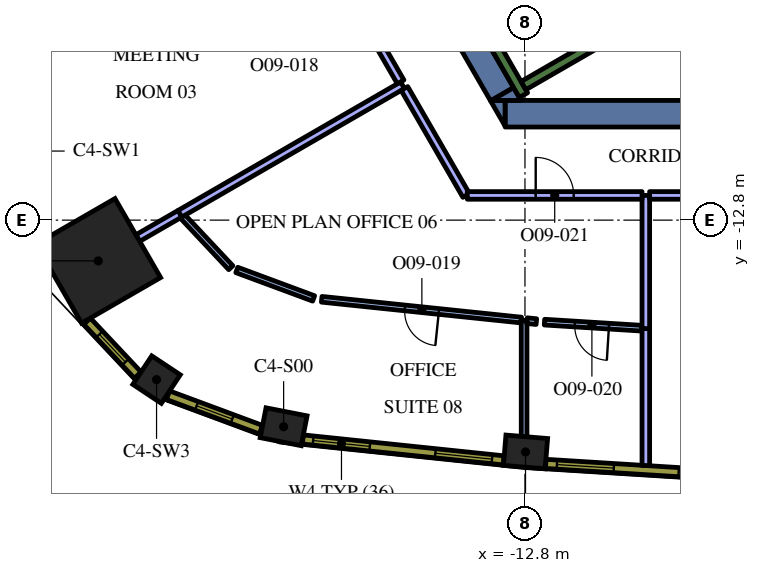
"""IFC4 building model, lengths in metres.
Left out: names, types, materials, properties, quantities, classifications, styles, units other than length and angle.
Written with IfcOpenShell. Run it as: python <this file> out.ifc"""

import sys

from ifc_helpers import new_model, si_unit, direction, frame, frame_2d, origin, origin_2d, place, context, subcontext, project, spatial, polyline, rectangle, outline, extrude, element, fill, save


model = new_model("IFC4")
c1 = context("Model", 3, precision=1e-05, world=origin(), true_north=direction((0.0, 1.0)))
c2 = subcontext(c1, "Body", "Model", "MODEL_VIEW")
j1 = project(units=[si_unit("LENGTHUNIT", "METRE"), si_unit("PLANEANGLEUNIT", "RADIAN")], contexts=[c1])
p1 = place(None, origin())
s1 = spatial("IfcSite", under=j1, at=p1, CompositionType="ELEMENT")
p2 = place(p1, origin())
s2 = spatial("IfcBuilding", under=s1, at=p2, CompositionType="ELEMENT")
p3 = place(p2, frame((0.0, 0.0, 243.6)))
s3 = spatial("IfcBuildingStorey", under=s2, at=p3, CompositionType="ELEMENT", Elevation=243.6)
p4 = place(p3, frame((-24.027, -13.872, 0.0), z_axis=(0.0, 0.0, 1.0), x_axis=(-0.866025403784, -0.5, 0.0)))
e1 = element("IfcColumn", 1, at=p4, inside=s3, PredefinedType="COLUMN", context=c2, shape_type="SweptSolid", body=[
    extrude(rectangle(XDim=2.4, YDim=2.4, at=origin_2d()), origin(), (0.0, 0.0, 1.0), 4.2),
])
for number, where, z_axis, x_axis in (
    (2, (-19.15, -18.237, 0.0), (0.0, 0.0, 1.0), (0.981, -0.192, 0.0)),
    (3, (-12.785, -18.9, 0.0), (0.0, 0.0, 1.0), (0.997, -0.083, 0.0)),
):
    element("IfcColumn", number, at=place(p3, frame(where, z_axis=z_axis, x_axis=x_axis)), inside=s3, PredefinedType="COLUMN", context=c2, shape_type="SweptSolid", body=[
        extrude(rectangle(XDim=1.1, YDim=0.8, at=origin_2d()), origin(), (0.0, 0.0, 1.0), 4.2),
    ])
p5 = place(p3, frame((-22.494, -16.997, 0.0), z_axis=(0.0, 0.0, 1.0), x_axis=(0.833238868178, -0.552913183563, 0.0)))
e4 = element("IfcColumn", 4, at=p5, inside=s3, PredefinedType="COLUMN", context=c2, shape_type="SweptSolid", body=[
    extrude(rectangle(XDim=0.9, YDim=0.9, at=origin_2d()), origin(), (0.0, 0.0, 1.0), 4.2),
])
p6 = place(p3, frame((8.904, -10.0, 0.0), z_axis=(0.0, 0.0, 1.0), x_axis=(-1.0, 0.0, 0.0)))
e5 = element("IfcWall", 5, at=p6, inside=s3, PredefinedType="SOLIDWALL", context=c2, shape_type="SweptSolid", body=[
    extrude(rectangle(XDim=22.226, YDim=0.7, at=frame_2d((11.113, 0.0))), origin(), (0.0, 0.0, 1.0), 4.2),
])
p7 = place(p3, origin())
e6 = element("IfcWall", 6, at=p7, inside=s3, PredefinedType="SOLIDWALL", context=c2, shape_type="SweptSolid", body=[
    extrude(outline(polyline([(-13.712, -9.65), (-13.324, -9.65), (-13.324, -10.322), (-13.712, -9.65)])), origin(), (0.0, 0.0, 1.0), 4.2),
])
p8 = place(p3, frame((-13.402, -9.487, 0.0), z_axis=(0.0, 0.0, 1.0), x_axis=(-0.500020498207, 0.866013568815, 0.0)))
e7 = element("IfcWall", 7, at=p8, inside=s3, PredefinedType="SOLIDWALL", context=c2, shape_type="SweptSolid", body=[
    extrude(rectangle(XDim=3.829, YDim=0.7, at=frame_2d((1.915, 0.0))), origin(), (0.0, 0.0, 1.0), 4.2),
])
e8 = element("IfcWall", 8, at=p7, inside=s3, PredefinedType="SOLIDWALL", context=c2, shape_type="SweptSolid", body=[
    extrude(outline(polyline([(-12.904, -9.65), (-13.68, -9.65), (-13.098, -9.314), (-12.904, -9.65)])), origin(), (0.0, 0.0, 1.0), 4.2),
])
p9 = place(p3, frame((-12.84, -9.511, 0.0), z_axis=(0.0, 0.0, 1.0), x_axis=(-0.499997733992, 0.866026712061, 0.0)))
e9 = element("IfcWall", 9, at=p9, inside=s3, PredefinedType="SOLIDWALL", context=c2, shape_type="SweptSolid", body=[
    extrude(rectangle(XDim=3.634, YDim=0.25, at=frame_2d((1.817, 0.0))), origin(), (0.0, 0.0, 1.0), 4.2),
])
p10 = place(p3, frame((-12.84, -9.261, 0.0), z_axis=(0.0, 0.0, 1.0), x_axis=(0.866016039709, 0.500016218704, 0.0)))
e10 = element("IfcWall", 10, at=p10, inside=s3, PredefinedType="SOLIDWALL", context=c2, shape_type="SweptSolid", body=[
    extrude(rectangle(XDim=7.05, YDim=0.25, at=frame_2d((3.525, 0.0))), origin(), (0.0, 0.0, 1.0), 4.2),
])
p11 = place(p3, frame((-9.62, -19.257, 0.0), z_axis=(0.0, 0.0, 1.0), x_axis=(0.0, 1.0, 0.0)))
e11 = element("IfcWall", 11, at=p11, inside=s3, PredefinedType="PARTITIONING", context=c2, shape_type="SweptSolid", body=[
    extrude(rectangle(XDim=3.611, YDim=0.2, at=frame_2d((1.806, 0.0))), origin(), (0.0, 0.0, 1.0), 3.45),
])
p12 = place(p3, frame((-9.62, -15.654, 0.0), z_axis=(0.0, 0.0, 1.0), x_axis=(0.0, 1.0, 0.0)))
e12 = element("IfcWall", 12, at=p12, inside=s3, PredefinedType="PARTITIONING", context=c2, shape_type="SweptSolid", body=[
    extrude(rectangle(XDim=3.504, YDim=0.2, at=frame_2d((1.752, 0.0))), origin(), (0.0, 0.0, 1.0), 3.45),
])
p13 = place(p3, frame((-9.52, -12.15, 0.0), z_axis=(0.0, 0.0, 1.0), x_axis=(1.0, 0.0, 0.0)))
e13 = element("IfcWall", 13, at=p13, inside=s3, PredefinedType="PARTITIONING", context=c2, shape_type="SweptSolid", body=[
    extrude(rectangle(XDim=2.49, YDim=0.2, at=frame_2d((1.245, 0.0))), origin(), (0.0, 0.0, 1.0), 3.45),
])
p14 = place(p3, frame((-21.873, -12.628, 0.0), z_axis=(0.0, 0.0, 1.0), x_axis=(-0.866052988967, -0.499952218018, 0.0)))
e14 = element("IfcWall", 14, at=p14, inside=s3, PredefinedType="PARTITIONING", context=c2, shape_type="SweptSolid", body=[
    extrude(rectangle(XDim=1.288, YDim=0.2, at=frame_2d((0.644, 0.0))), origin(), (0.0, 0.0, 1.0), 3.45),
])
p15 = place(p3, frame((-16.021, -9.25, 0.0), z_axis=(0.0, 0.0, 1.0), x_axis=(-0.86602692059, -0.499997372806, 0.0)))
e15 = element("IfcWall", 15, at=p15, inside=s3, PredefinedType="PARTITIONING", context=c2, shape_type="SweptSolid", body=[
    extrude(rectangle(XDim=6.765, YDim=0.2, at=frame_2d((3.382, 0.0))), origin(), (0.0, 0.0, 1.0), 3.45),
])
p16 = place(p3, frame((-17.545, -6.612, 0.0), z_axis=(0.0, 0.0, 1.0), x_axis=(0.500006981563, -0.86602137294, 0.0)))
e16 = element("IfcWall", 16, at=p16, inside=s3, PredefinedType="PARTITIONING", context=c2, shape_type="SweptSolid", body=[
    extrude(rectangle(XDim=2.946, YDim=0.2, at=frame_2d((1.473, 0.0))), origin(), (0.0, 0.0, 1.0), 3.45),
])
p17 = place(p3, frame((-12.823, -15.437, 0.0), z_axis=(0.0, 0.0, 1.0), x_axis=(0.0, -1.0, 0.0)))
e17 = element("IfcWall", 17, at=p17, inside=s3, PredefinedType="PARTITIONING", context=c2, shape_type="SweptSolid", body=[
    extrude(rectangle(XDim=3.058, YDim=0.15, at=frame_2d((1.529, 0.0))), origin(), (0.0, 0.0, 1.0), 3.45),
])
p18 = place(p3, frame((-21.806, -12.705, 0.0), z_axis=(0.0, 0.0, 1.0), x_axis=(0.684700980092, -0.728824099396, 0.0)))
e18 = element("IfcWall", 18, at=p18, inside=s3, PredefinedType="PARTITIONING", context=c2, shape_type="SweptSolid", body=[
    extrude(rectangle(XDim=1.848, YDim=0.15, at=frame_2d((0.924, 0.0))), origin(), (0.0, 0.0, 1.0), 3.45),
])
p19 = place(p3, frame((-20.383, -14.111, 0.0), z_axis=(0.0, 0.0, 1.0), x_axis=(0.937598383102, -0.347720105838, 0.0)))
e19 = element("IfcWall", 19, at=p19, inside=s3, PredefinedType="PARTITIONING", context=c2, shape_type="SweptSolid", body=[
    extrude(rectangle(XDim=2.156, YDim=0.15, at=frame_2d((1.078, 0.0))), origin(), (0.0, 0.0, 1.0), 3.45),
])
p20 = place(p3, frame((-12.898, -15.429, 0.0), z_axis=(0.0, 0.0, 1.0), x_axis=(-0.99462039429, 0.103587022653, 0.0)))
e20 = element("IfcWall", 20, at=p20, inside=s3, PredefinedType="PARTITIONING", context=c2, shape_type="SweptSolid", body=[
    extrude(rectangle(XDim=5.279, YDim=0.15, at=frame_2d((2.64, 0.0))), origin(), (0.0, 0.0, 1.0), 3.45),
])
p21 = place(p20, frame((2.179, 0.0, 0.0)))
e21 = element("IfcOpeningElement", 21, at=p21, cuts=e20, PredefinedType="OPENING", context=c2, shape_type="SweptSolid", body=[
    extrude(rectangle(XDim=0.9, YDim=2.1, at=frame_2d((0.45, 1.05))), frame((0.0, 0.085, 0.0), z_axis=(0.0, -1.0, 0.0), x_axis=(1.0, 0.0, 0.0)), (0.0, 0.0, 1.0), 0.17),
])
p22 = place(p3, frame((-12.748, -15.445, 0.0), z_axis=(0.0, 0.0, 1.0), x_axis=(0.99468140225, -0.102999553487, 0.0)))
e22 = element("IfcWall", 22, at=p22, inside=s3, PredefinedType="PARTITIONING", context=c2, shape_type="SweptSolid", body=[
    extrude(rectangle(XDim=0.249, YDim=0.15, at=frame_2d((0.125, 0.0))), origin(), (0.0, 0.0, 1.0), 3.45),
])
p23 = place(p3, frame((-9.72, -15.644, 0.0), z_axis=(0.0, 0.0, 1.0), x_axis=(-0.998064382534, 0.062189133425, 0.0)))
e23 = element("IfcWall", 23, at=p23, inside=s3, PredefinedType="PARTITIONING", context=c2, shape_type="SweptSolid", body=[
    extrude(rectangle(XDim=2.571, YDim=0.15, at=frame_2d((1.286, 0.0))), origin(), (0.0, 0.0, 1.0), 3.45),
])
p24 = place(p23, frame((0.871, 0.0, 0.0)))
e24 = element("IfcOpeningElement", 24, at=p24, cuts=e23, PredefinedType="OPENING", context=c2, shape_type="SweptSolid", body=[
    extrude(rectangle(XDim=0.9, YDim=2.1, at=frame_2d((0.45, 1.05))), frame((0.0, 0.085, 0.0), z_axis=(0.0, -1.0, 0.0), x_axis=(1.0, 0.0, 0.0)), (0.0, 0.0, 1.0), 0.17),
])
p25 = place(p3, frame((-15.971, -9.337, 0.0), z_axis=(0.0, 0.0, 1.0), x_axis=(0.500010870188, -0.866019127788, 0.0)))
e25 = element("IfcWall", 25, at=p25, inside=s3, PredefinedType="PARTITIONING", context=c2, shape_type="SweptSolid", body=[
    extrude(rectangle(XDim=3.249, YDim=0.2, at=frame_2d((1.624, 0.0))), origin(), (0.0, 0.0, 1.0), 3.45),
])
p26 = place(p3, frame((-14.317, -12.15, 0.0), z_axis=(0.0, 0.0, 1.0), x_axis=(1.0, 0.0, 0.0)))
e26 = element("IfcWall", 26, at=p26, inside=s3, PredefinedType="PARTITIONING", context=c2, shape_type="SweptSolid", body=[
    extrude(rectangle(XDim=4.597, YDim=0.2, at=frame_2d((2.299, 0.0))), origin(), (0.0, 0.0, 1.0), 3.45),
])
p27 = place(p26, frame((1.8, 0.0, 0.0)))
e27 = element("IfcOpeningElement", 27, at=p27, cuts=e26, PredefinedType="OPENING", context=c2, shape_type="SweptSolid", body=[
    extrude(rectangle(XDim=1.0, YDim=2.1, at=frame_2d((0.5, 1.05))), frame((0.0, 0.11, 0.0), z_axis=(0.0, -1.0, 0.0), x_axis=(1.0, 0.0, 0.0)), (0.0, 0.0, 1.0), 0.22),
])
p28 = place(p3, frame((-18.644, -18.571, 0.0), z_axis=(0.0, 0.0, 1.0), x_axis=(0.994621961215, -0.103571976272, 0.0)))
e28 = element("IfcWall", 28, at=p28, inside=s3, PredefinedType="SOLIDWALL", context=c2, shape_type="SweptSolid", body=[
    extrude(rectangle(XDim=5.311, YDim=0.24, at=frame_2d((2.655, 0.0))), origin(), (0.0, 0.0, 1.0), 3.95),
])
p29 = place(p28, frame((0.271, 0.0, 0.9)))
e29 = element("IfcOpeningElement", 29, at=p29, cuts=e28, PredefinedType="OPENING", context=c2, shape_type="SweptSolid", body=[
    extrude(rectangle(XDim=1.5, YDim=2.55, at=frame_2d((0.75, 1.275))), frame((0.0, 0.13, 0.0), z_axis=(0.0, -1.0, 0.0), x_axis=(1.0, 0.0, 0.0)), (0.0, 0.0, 1.0), 0.26),
])
p30 = place(p28, frame((3.504, 0.0, 0.9)))
e30 = element("IfcOpeningElement", 30, at=p30, cuts=e28, PredefinedType="OPENING", context=c2, shape_type="SweptSolid", body=[
    extrude(rectangle(XDim=1.5, YDim=2.55, at=frame_2d((0.75, 1.275))), frame((0.0, 0.13, 0.0), z_axis=(0.0, -1.0, 0.0), x_axis=(1.0, 0.0, 0.0)), (0.0, 0.0, 1.0), 0.26),
])
p31 = place(p3, frame((-12.253, -19.213, 0.0), z_axis=(0.0, 0.0, 1.0), x_axis=(0.9980633213, -0.062206162685, 0.0)))
e31 = element("IfcWall", 31, at=p31, inside=s3, PredefinedType="SOLIDWALL", context=c2, shape_type="SweptSolid", body=[
    extrude(rectangle(XDim=5.298, YDim=0.24, at=frame_2d((2.649, 0.0))), origin(), (0.0, 0.0, 1.0), 3.95),
])
p32 = place(p31, frame((0.294, 0.0, 0.9)))
e32 = element("IfcOpeningElement", 32, at=p32, cuts=e31, PredefinedType="OPENING", context=c2, shape_type="SweptSolid", body=[
    extrude(rectangle(XDim=1.5, YDim=2.55, at=frame_2d((0.75, 1.275))), frame((0.0, 0.13, 0.0), z_axis=(0.0, -1.0, 0.0), x_axis=(1.0, 0.0, 0.0)), (0.0, 0.0, 1.0), 0.26),
])
p33 = place(p31, frame((3.504, 0.0, 0.9)))
e33 = element("IfcOpeningElement", 33, at=p33, cuts=e31, PredefinedType="OPENING", context=c2, shape_type="SweptSolid", body=[
    extrude(rectangle(XDim=1.5, YDim=2.55, at=frame_2d((0.75, 1.275))), frame((0.0, 0.13, 0.0), z_axis=(0.0, -1.0, 0.0), x_axis=(1.0, 0.0, 0.0)), (0.0, 0.0, 1.0), 0.26),
])
p34 = place(p3, frame((-24.323, -15.459, 0.0), z_axis=(0.0, 0.0, 1.0), x_axis=(0.684770274166, -0.728758994194, 0.0)))
e34 = element("IfcWall", 34, at=p34, inside=s3, PredefinedType="SOLIDWALL", context=c2, shape_type="SweptSolid", body=[
    extrude(rectangle(XDim=1.948, YDim=0.24, at=frame_2d((0.974, 0.0))), origin(), (0.0, 0.0, 1.0), 3.95),
])
p35 = place(p34, frame((0.474, 0.0, 0.9)))
e35 = element("IfcOpeningElement", 35, at=p35, cuts=e34, PredefinedType="OPENING", context=c2, shape_type="SweptSolid", body=[
    extrude(rectangle(XDim=1.0, YDim=2.55, at=frame_2d((0.5, 1.275))), frame((0.0, 0.13, 0.0), z_axis=(0.0, -1.0, 0.0), x_axis=(1.0, 0.0, 0.0)), (0.0, 0.0, 1.0), 0.26),
])
p36 = place(p3, frame((-22.194, -17.406, 0.0), z_axis=(0.0, 0.0, 1.0), x_axis=(0.937569171184, -0.347798863203, 0.0)))
e36 = element("IfcWall", 36, at=p36, inside=s3, PredefinedType="SOLIDWALL", context=c2, shape_type="SweptSolid", body=[
    extrude(rectangle(XDim=2.609, YDim=0.24, at=frame_2d((1.305, 0.0))), origin(), (0.0, 0.0, 1.0), 3.95),
])
p37 = place(p36, frame((0.805, 0.0, 0.9)))
e37 = element("IfcOpeningElement", 37, at=p37, cuts=e36, PredefinedType="OPENING", context=c2, shape_type="SweptSolid", body=[
    extrude(rectangle(XDim=1.0, YDim=2.55, at=frame_2d((0.5, 1.275))), frame((0.0, 0.13, 0.0), z_axis=(0.0, -1.0, 0.0), x_axis=(1.0, 0.0, 0.0)), (0.0, 0.0, 1.0), 0.26),
])
p38 = place(p21, origin())
e38 = element("IfcDoor", 38, at=p38, inside=s3, OperationType="SINGLE_SWING_LEFT", PredefinedType="DOOR", context=c2, shape_type="SweptSolid", body=[
    extrude(rectangle(XDim=0.9, YDim=2.1, at=frame_2d((0.45, 1.05))), frame((0.0, 0.025, 0.0), z_axis=(0.0, -1.0, 0.0), x_axis=(1.0, 0.0, 0.0)), (0.0, 0.0, 1.0), 0.05),
])
fill(e21, e38)
p39 = place(p24, origin())
e39 = element("IfcDoor", 39, at=p39, inside=s3, OperationType="SINGLE_SWING_RIGHT", PredefinedType="DOOR", context=c2, shape_type="SweptSolid", body=[
    extrude(rectangle(XDim=0.9, YDim=2.1, at=frame_2d((0.45, 1.05))), frame((0.0, 0.025, 0.0), z_axis=(0.0, -1.0, 0.0), x_axis=(1.0, 0.0, 0.0)), (0.0, 0.0, 1.0), 0.05),
])
fill(e24, e39)
p40 = place(p27, origin())
e40 = element("IfcDoor", 40, at=p40, inside=s3, OperationType="SINGLE_SWING_RIGHT", PredefinedType="DOOR", context=c2, shape_type="SweptSolid", body=[
    extrude(rectangle(XDim=1.0, YDim=2.1, at=frame_2d((0.5, 1.05))), frame((0.0, 0.025, 0.0), z_axis=(0.0, -1.0, 0.0), x_axis=(1.0, 0.0, 0.0)), (0.0, 0.0, 1.0), 0.05),
])
fill(e27, e40)
p41 = place(p29, origin())
e41 = element("IfcWindow", 41, at=p41, inside=s3, PartitioningType="SINGLE_PANEL", PredefinedType="WINDOW", context=c2, shape_type="SweptSolid", body=[
    extrude(rectangle(XDim=1.5, YDim=2.55, at=frame_2d((0.75, 1.275))), frame((0.0, 0.04, 0.0), z_axis=(0.0, -1.0, 0.0), x_axis=(1.0, 0.0, 0.0)), (0.0, 0.0, 1.0), 0.06),
])
fill(e29, e41)
p42 = place(p30, origin())
e42 = element("IfcWindow", 42, at=p42, inside=s3, PartitioningType="SINGLE_PANEL", PredefinedType="WINDOW", context=c2, shape_type="SweptSolid", body=[
    extrude(rectangle(XDim=1.5, YDim=2.55, at=frame_2d((0.75, 1.275))), frame((0.0, 0.04, 0.0), z_axis=(0.0, -1.0, 0.0), x_axis=(1.0, 0.0, 0.0)), (0.0, 0.0, 1.0), 0.06),
])
fill(e30, e42)
p43 = place(p32, origin())
e43 = element("IfcWindow", 43, at=p43, inside=s3, PartitioningType="SINGLE_PANEL", PredefinedType="WINDOW", context=c2, shape_type="SweptSolid", body=[
    extrude(rectangle(XDim=1.5, YDim=2.55, at=frame_2d((0.75, 1.275))), frame((0.0, 0.04, 0.0), z_axis=(0.0, -1.0, 0.0), x_axis=(1.0, 0.0, 0.0)), (0.0, 0.0, 1.0), 0.06),
])
fill(e32, e43)
p44 = place(p33, origin())
e44 = element("IfcWindow", 44, at=p44, inside=s3, PartitioningType="SINGLE_PANEL", PredefinedType="WINDOW", context=c2, shape_type="SweptSolid", body=[
    extrude(rectangle(XDim=1.5, YDim=2.55, at=frame_2d((0.75, 1.275))), frame((0.0, 0.04, 0.0), z_axis=(0.0, -1.0, 0.0), x_axis=(1.0, 0.0, 0.0)), (0.0, 0.0, 1.0), 0.06),
])
fill(e33, e44)
p45 = place(p35, origin())
e45 = element("IfcWindow", 45, at=p45, inside=s3, PartitioningType="SINGLE_PANEL", PredefinedType="WINDOW", context=c2, shape_type="SweptSolid", body=[
    extrude(rectangle(XDim=1.0, YDim=2.55, at=frame_2d((0.5, 1.275))), frame((0.0, 0.04, 0.0), z_axis=(0.0, -1.0, 0.0), x_axis=(1.0, 0.0, 0.0)), (0.0, 0.0, 1.0), 0.06),
])
fill(e35, e45)
p46 = place(p37, origin())
e46 = element("IfcWindow", 46, at=p46, inside=s3, PartitioningType="SINGLE_PANEL", PredefinedType="WINDOW", context=c2, shape_type="SweptSolid", body=[
    extrude(rectangle(XDim=1.0, YDim=2.55, at=frame_2d((0.5, 1.275))), frame((0.0, 0.04, 0.0), z_axis=(0.0, -1.0, 0.0), x_axis=(1.0, 0.0, 0.0)), (0.0, 0.0, 1.0), 0.06),
])
fill(e37, e46)
save(model, sys.argv[1])
